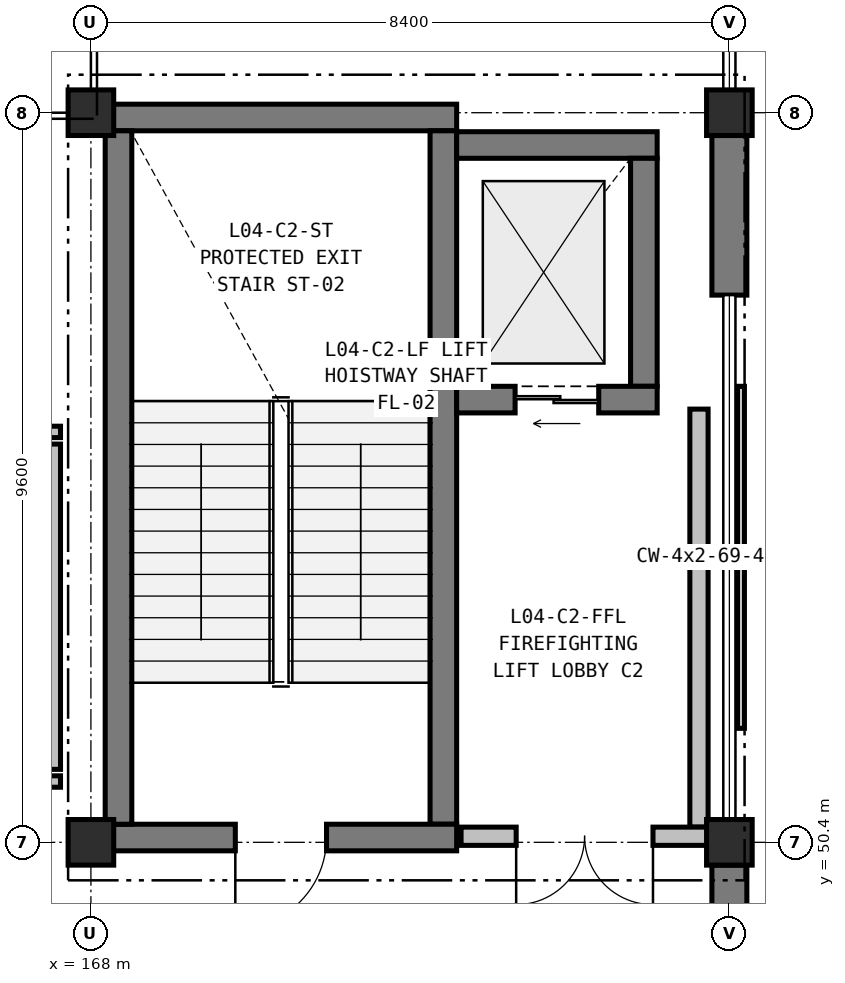
"""IFC4 building model, lengths in metres.
Left out: names, types, materials, properties, quantities, classifications, styles, units other than length and angle.
Written with IfcOpenShell. Run it as: python <this file> out.ifc"""

import sys

from ifc_helpers import new_model, si_unit, direction, frame, frame_2d, origin, origin_2d, place, context, subcontext, project, spatial, rectangle, extrude, element, fill, save


model = new_model("IFC4")
c1 = context("Model", 3, precision=1e-05, world=origin(), true_north=direction((0.0, 1.0)))
c2 = subcontext(c1, "Body", "Model", "MODEL_VIEW")
j1 = project(units=[si_unit("LENGTHUNIT", "METRE"), si_unit("PLANEANGLEUNIT", "RADIAN")], contexts=[c1])
p1 = place(None, origin())
s1 = spatial("IfcSite", under=j1, at=p1, CompositionType="ELEMENT")
p2 = place(p1, origin())
s2 = spatial("IfcBuilding", under=s1, at=p2, CompositionType="ELEMENT")
p3 = place(p2, frame((0.0, 0.0, 22.2)))
s3 = spatial("IfcBuildingStorey", under=s2, at=p3, CompositionType="ELEMENT", Elevation=22.2)
for number, where, z_axis, x_axis in (
    (1, (168.0, 50.4, 0.0), (0.0, 0.0, 1.0), (1.0, 0.0, 0.0)),
    (2, (168.0, 60.0, 0.0), (0.0, 0.0, 1.0), (1.0, 0.0, 0.0)),
    (3, (176.4, 50.4, 0.0), (0.0, 0.0, 1.0), (1.0, 0.0, 0.0)),
    (4, (176.4, 60.0, 0.0), (0.0, 0.0, 1.0), (1.0, 0.0, 0.0)),
):
    element("IfcColumn", number, at=place(p3, frame(where, z_axis=z_axis, x_axis=x_axis)), inside=s3, PredefinedType="COLUMN", context=c2, shape_type="SweptSolid", body=[
        extrude(rectangle(XDim=0.6, YDim=0.6, at=origin_2d()), origin(), (0.0, 0.0, 1.0), 4.8),
    ])
p4 = place(p3, frame((176.4, 59.7, 0.0), z_axis=(0.0, 0.0, 1.0), x_axis=(0.0, -1.0, 0.0)))
e5 = element("IfcWall", 5, at=p4, inside=s3, PredefinedType="SOLIDWALL", context=c2, shape_type="SweptSolid", body=[
    extrude(rectangle(XDim=2.1, YDim=0.46, at=frame_2d((1.05, 0.0))), origin(), (0.0, 0.0, 1.0), 4.5),
])
p5 = place(p3, frame((176.4, 50.1, 0.0), z_axis=(0.0, 0.0, 1.0), x_axis=(0.0, -1.0, 0.0)))
e6 = element("IfcWall", 6, at=p5, inside=s3, PredefinedType="SOLIDWALL", context=c2, shape_type="SweptSolid", body=[
    extrude(rectangle(XDim=4.2, YDim=0.46, at=frame_2d((2.1, 0.0))), origin(), (0.0, 0.0, 1.0), 4.5),
])
p6 = place(p3, frame((168.188, 59.937, 0.0), z_axis=(0.0, 0.0, 1.0), x_axis=(1.0, 0.0, 0.0)))
e7 = element("IfcWall", 7, at=p6, inside=s3, PredefinedType="SHEAR", context=c2, shape_type="SweptSolid", body=[
    extrude(rectangle(XDim=4.624, YDim=0.35, at=frame_2d((2.312, 0.0))), origin(), (0.0, 0.0, 1.0), 4.5),
])
p7 = place(p3, frame((172.637, 59.762, 0.0), z_axis=(0.0, 0.0, 1.0), x_axis=(0.0, -1.0, 0.0)))
e8 = element("IfcWall", 8, at=p7, inside=s3, PredefinedType="SHEAR", context=c2, shape_type="SweptSolid", body=[
    extrude(rectangle(XDim=9.124, YDim=0.35, at=frame_2d((4.562, 0.0))), origin(), (0.0, 0.0, 1.0), 4.5),
])
p8 = place(p3, frame((172.812, 50.463, 0.0), z_axis=(0.0, 0.0, 1.0), x_axis=(-1.0, 0.0, 0.0)))
e9 = element("IfcWall", 9, at=p8, inside=s3, PredefinedType="SHEAR", context=c2, shape_type="SweptSolid", body=[
    extrude(rectangle(XDim=4.624, YDim=0.35, at=frame_2d((2.312, 0.0))), origin(), (0.0, 0.0, 1.0), 4.5),
])
p9 = place(p8, frame((1.712, 0.0, 0.0)))
e10 = element("IfcOpeningElement", 10, at=p9, cuts=e9, PredefinedType="OPENING", context=c2, shape_type="SweptSolid", body=[
    extrude(rectangle(XDim=1.2, YDim=2.2, at=frame_2d((0.6, 1.1))), frame((0.0, 0.185, 0.0), z_axis=(0.0, -1.0, 0.0), x_axis=(1.0, 0.0, 0.0)), (0.0, 0.0, 1.0), 0.37),
])
p10 = place(p3, frame((168.363, 50.638, 0.0), z_axis=(0.0, 0.0, 1.0), x_axis=(0.0, 1.0, 0.0)))
e11 = element("IfcWall", 11, at=p10, inside=s3, PredefinedType="SHEAR", context=c2, shape_type="SweptSolid", body=[
    extrude(rectangle(XDim=9.124, YDim=0.35, at=frame_2d((4.562, 0.0))), origin(), (0.0, 0.0, 1.0), 4.5),
])
p11 = place(p3, frame((172.812, 59.575, 0.0), z_axis=(0.0, 0.0, 1.0), x_axis=(1.0, 0.0, 0.0)))
e12 = element("IfcWall", 12, at=p11, inside=s3, PredefinedType="SHEAR", context=c2, shape_type="SweptSolid", body=[
    extrude(rectangle(XDim=2.638, YDim=0.35, at=frame_2d((1.319, 0.0))), origin(), (0.0, 0.0, 1.0), 4.5),
])
p12 = place(p3, frame((175.275, 59.4, 0.0), z_axis=(0.0, 0.0, 1.0), x_axis=(0.0, -1.0, 0.0)))
e13 = element("IfcWall", 13, at=p12, inside=s3, PredefinedType="SHEAR", context=c2, shape_type="SweptSolid", body=[
    extrude(rectangle(XDim=3.0, YDim=0.35, at=frame_2d((1.5, 0.0))), origin(), (0.0, 0.0, 1.0), 4.5),
])
p13 = place(p3, frame((175.45, 56.225, 0.0), z_axis=(0.0, 0.0, 1.0), x_axis=(-1.0, 0.0, 0.0)))
e14 = element("IfcWall", 14, at=p13, inside=s3, PredefinedType="SHEAR", context=c2, shape_type="SweptSolid", body=[
    extrude(rectangle(XDim=2.638, YDim=0.35, at=frame_2d((1.319, 0.0))), origin(), (0.0, 0.0, 1.0), 4.5),
])
p14 = place(p13, frame((0.769, 0.0, 0.0)))
e15 = element("IfcOpeningElement", 15, at=p14, cuts=e14, PredefinedType="OPENING", context=c2, shape_type="SweptSolid", body=[
    extrude(rectangle(XDim=1.1, YDim=2.2, at=frame_2d((0.55, 1.1))), frame((0.0, 0.185, 0.0), z_axis=(0.0, -1.0, 0.0), x_axis=(1.0, 0.0, 0.0)), (0.0, 0.0, 1.0), 0.37),
])
p15 = place(p3, frame((176.0, 56.1, 0.0), z_axis=(0.0, 0.0, 1.0), x_axis=(0.0, -1.0, 0.0)))
e16 = element("IfcWall", 16, at=p15, inside=s3, PredefinedType="PARTITIONING", context=c2, shape_type="SweptSolid", body=[
    extrude(rectangle(XDim=5.5, YDim=0.24, at=frame_2d((2.75, 0.0))), origin(), (0.0, 0.0, 1.0), 3.825),
])
p16 = place(p3, frame((176.12, 50.48, 0.0), z_axis=(0.0, 0.0, 1.0), x_axis=(-1.0, 0.0, 0.0)))
e17 = element("IfcWall", 17, at=p16, inside=s3, PredefinedType="PARTITIONING", context=c2, shape_type="SweptSolid", body=[
    extrude(rectangle(XDim=3.25, YDim=0.24, at=frame_2d((1.625, 0.0))), origin(), (0.0, 0.0, 1.0), 3.825),
])
p17 = place(p16, frame((0.725, 0.0, 0.0)))
e18 = element("IfcOpeningElement", 18, at=p17, cuts=e17, PredefinedType="OPENING", context=c2, shape_type="SweptSolid", body=[
    extrude(rectangle(XDim=1.8, YDim=2.25, at=frame_2d((0.9, 1.125))), frame((0.0, 0.13, 0.0), z_axis=(0.0, -1.0, 0.0), x_axis=(1.0, 0.0, 0.0)), (0.0, 0.0, 1.0), 0.26),
])
p18 = place(p3, frame((167.6, 51.2, 0.0), z_axis=(0.0, 0.0, 1.0), x_axis=(-1.0, 0.0, 0.0)))
e19 = element("IfcWall", 19, at=p18, inside=s3, PredefinedType="PARTITIONING", context=c2, shape_type="SweptSolid", body=[
    extrude(rectangle(XDim=6.8, YDim=0.15, at=frame_2d((3.4, 0.0))), origin(), (0.0, 0.0, 1.0), 4.5),
])
p19 = place(p18, frame((1.25, 0.0, 0.0)))
e20 = element("IfcOpeningElement", 20, at=p19, cuts=e19, PredefinedType="OPENING", context=c2, shape_type="SweptSolid", body=[
    extrude(rectangle(XDim=0.9, YDim=2.1, at=frame_2d((0.45, 1.05))), frame((0.0, 0.085, 0.0), z_axis=(0.0, -1.0, 0.0), x_axis=(1.0, 0.0, 0.0)), (0.0, 0.0, 1.0), 0.17),
])
p20 = place(p18, frame((4.625, 0.0, 0.0)))
e21 = element("IfcOpeningElement", 21, at=p20, cuts=e19, PredefinedType="OPENING", context=c2, shape_type="SweptSolid", body=[
    extrude(rectangle(XDim=0.95, YDim=2.15, at=frame_2d((0.475, 1.075))), frame((0.0, 0.085, 0.0), z_axis=(0.0, -1.0, 0.0), x_axis=(1.0, 0.0, 0.0)), (0.0, 0.0, 1.0), 0.17),
])
p21 = place(p3, frame((160.8, 55.8, 0.0), z_axis=(0.0, 0.0, 1.0), x_axis=(1.0, 0.0, 0.0)))
e22 = element("IfcWall", 22, at=p21, inside=s3, PredefinedType="PARTITIONING", context=c2, shape_type="SweptSolid", body=[
    extrude(rectangle(XDim=6.8, YDim=0.15, at=frame_2d((3.4, 0.0))), origin(), (0.0, 0.0, 1.0), 4.5),
])
p22 = place(p3, frame((167.525, 51.36, 0.0), z_axis=(0.0, 0.0, 1.0), x_axis=(0.0, 1.0, 0.0)))
e23 = element("IfcWall", 23, at=p22, inside=s3, PredefinedType="PARTITIONING", context=c2, shape_type="SweptSolid", body=[
    extrude(rectangle(XDim=4.28, YDim=0.15, at=frame_2d((2.14, 0.0))), origin(), (0.0, 0.0, 1.0), 4.5),
])
p23 = place(p9, origin())
e24 = element("IfcDoor", 24, at=p23, inside=s3, OperationType="SINGLE_SWING_RIGHT", PredefinedType="DOOR", context=c2, shape_type="SweptSolid", body=[
    extrude(rectangle(XDim=1.2, YDim=2.2, at=frame_2d((0.6, 1.1))), frame((0.0, 0.025, 0.0), z_axis=(0.0, -1.0, 0.0), x_axis=(1.0, 0.0, 0.0)), (0.0, 0.0, 1.0), 0.05),
])
fill(e10, e24)
p24 = place(p14, origin())
e25 = element("IfcDoor", 25, at=p24, inside=s3, OperationType="DOUBLE_DOOR_SLIDING", PredefinedType="DOOR", context=c2, shape_type="SweptSolid", body=[
    extrude(rectangle(XDim=1.1, YDim=2.2, at=frame_2d((0.55, 1.1))), frame((0.0, 0.025, 0.0), z_axis=(0.0, -1.0, 0.0), x_axis=(1.0, 0.0, 0.0)), (0.0, 0.0, 1.0), 0.05),
])
fill(e15, e25)
p25 = place(p17, origin())
e26 = element("IfcDoor", 26, at=p25, inside=s3, OperationType="DOUBLE_DOOR_SINGLE_SWING", PredefinedType="DOOR", context=c2, shape_type="SweptSolid", body=[
    extrude(rectangle(XDim=1.8, YDim=2.25, at=frame_2d((0.9, 1.125))), frame((0.0, 0.025, 0.0), z_axis=(0.0, -1.0, 0.0), x_axis=(1.0, 0.0, 0.0)), (0.0, 0.0, 1.0), 0.05),
])
fill(e18, e26)
save(model, sys.argv[1])
